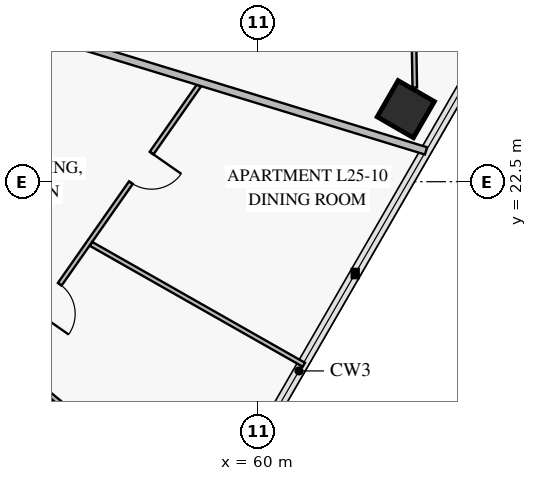
"""IFC4 building model, lengths in metres.
Left out: names, types, materials, properties, quantities, classifications, styles, units other than length and angle.
Written with IfcOpenShell. Run it as: python <this file> out.ifc"""

import sys

from ifc_helpers import new_model, si_unit, direction, frame, frame_2d, origin, origin_2d, place, context, subcontext, project, spatial, rectangle, extrude, element, fill, save


model = new_model("IFC4")
c1 = context("Model", 3, precision=1e-05, world=origin(), true_north=direction((0.0, 1.0)))
c2 = subcontext(c1, "Body", "Model", "MODEL_VIEW")
j1 = project(units=[si_unit("LENGTHUNIT", "METRE"), si_unit("PLANEANGLEUNIT", "RADIAN")], contexts=[c1])
p1 = place(None, origin())
s1 = spatial("IfcSite", under=j1, at=p1, CompositionType="ELEMENT")
p2 = place(p1, origin())
s2 = spatial("IfcBuilding", under=s1, at=p2, CompositionType="ELEMENT")
p3 = place(p2, frame((0.0, 0.0, 103.8)))
s3 = spatial("IfcBuildingStorey", under=s2, at=p3, CompositionType="ELEMENT", Elevation=103.8)
p4 = place(p3, frame((63.889, 24.408, 0.0), z_axis=(0.0, 0.0, 1.0), x_axis=(0.5, 0.866025403784, 0.0)))
e1 = element("IfcColumn", 1, at=p4, inside=s3, PredefinedType="COLUMN", context=c2, shape_type="SweptSolid", body=[
    extrude(rectangle(XDim=1.1, YDim=1.1, at=origin_2d()), origin(), (0.0, 0.0, 1.0), 3.55),
])
p5 = place(p3, frame((53.335, 17.732, 0.0), z_axis=(0.0, 0.0, 1.0), x_axis=(0.573576398243, 0.819152070972, 0.0)))
e2 = element("IfcWall", 2, at=p5, inside=s3, PredefinedType="PARTITIONING", context=c2, shape_type="SweptSolid", body=[
    extrude(rectangle(XDim=8.907, YDim=0.12, at=frame_2d((4.453, 0.0))), origin(), (0.0, 0.0, 1.0), 3.55),
])
p6 = place(p5, frame((1.576, 0.0, 0.0)))
e3 = element("IfcOpeningElement", 3, at=p6, cuts=e2, PredefinedType="OPENING", context=c2, shape_type="SweptSolid", body=[
    extrude(rectangle(XDim=0.95, YDim=2.1, at=frame_2d((0.475, 1.05))), frame((0.0, 0.072, 0.0), z_axis=(0.0, -1.0, 0.0), x_axis=(1.0, 0.0, 0.0)), (0.0, 0.0, 1.0), 0.144),
])
p7 = place(p5, frame((5.789, 0.0, 0.0)))
e4 = element("IfcOpeningElement", 4, at=p7, cuts=e2, PredefinedType="OPENING", context=c2, shape_type="SweptSolid", body=[
    extrude(rectangle(XDim=0.95, YDim=2.1, at=frame_2d((0.475, 1.05))), frame((0.0, 0.072, 0.0), z_axis=(0.0, -1.0, 0.0), x_axis=(1.0, 0.0, 0.0)), (0.0, 0.0, 1.0), 0.144),
])
p8 = place(p3, frame((53.446, 17.771, 0.0), z_axis=(0.0, 0.0, 1.0), x_axis=(0.774958236323, -0.632012446045, 0.0)))
e5 = element("IfcWall", 5, at=p8, inside=s3, PredefinedType="PARTITIONING", context=c2, shape_type="SweptSolid", body=[
    extrude(rectangle(XDim=4.017, YDim=0.12, at=frame_2d((2.009, 0.0))), origin(), (0.0, 0.0, 1.0), 3.55),
])
p9 = place(p3, frame((64.126, 24.979, 0.0), z_axis=(0.0, 0.0, 1.0), x_axis=(-0.017448954527, 0.999847755404, 0.0)))
e6 = element("IfcWall", 6, at=p9, inside=s3, PredefinedType="PARTITIONING", context=c2, shape_type="SweptSolid", body=[
    extrude(rectangle(XDim=5.387, YDim=0.12, at=frame_2d((2.693, 0.0))), origin(), (0.0, 0.0, 1.0), 2.8),
])
p10 = place(p9, frame((2.303, 0.0, 0.0)))
e7 = element("IfcOpeningElement", 7, at=p10, cuts=e6, PredefinedType="OPENING", context=c2, shape_type="SweptSolid", body=[
    extrude(rectangle(XDim=0.95, YDim=2.1, at=frame_2d((0.475, 1.05))), frame((0.0, 0.072, 0.0), z_axis=(0.0, -1.0, 0.0), x_axis=(1.0, 0.0, 0.0)), (0.0, 0.0, 1.0), 0.144),
])
p11 = place(p3, frame((45.073, 19.96, 0.0), z_axis=(0.0, 0.0, 1.0), x_axis=(0.60181525353, -0.798635336445, 0.0)))
e8 = element("IfcWall", 8, at=p11, inside=s3, PredefinedType="PARTITIONING", context=c2, shape_type="SweptSolid", body=[
    extrude(rectangle(XDim=16.384, YDim=0.2, at=frame_2d((8.192, 0.0))), origin(), (0.0, 0.0, 1.0), 2.8),
])
p12 = place(p3, frame((55.61, 20.862, 0.0), z_axis=(0.0, 0.0, 1.0), x_axis=(0.869533184144, -0.493874520169, 0.0)))
e9 = element("IfcWall", 9, at=p12, inside=s3, PredefinedType="PARTITIONING", context=c2, shape_type="SweptSolid", body=[
    extrude(rectangle(XDim=6.437, YDim=0.12, at=frame_2d((3.219, 0.0))), origin(), (0.0, 0.0, 1.0), 2.8),
])
p13 = place(p3, frame((49.04, 28.013, 0.0), z_axis=(0.0, 0.0, 1.0), x_axis=(0.956308788135, -0.292358515757, 0.0)))
e10 = element("IfcWall", 10, at=p13, inside=s3, PredefinedType="PARTITIONING", context=c2, shape_type="SweptSolid", body=[
    extrude(rectangle(XDim=16.084, YDim=0.2, at=frame_2d((8.042, 0.0))), origin(), (0.0, 0.0, 1.0), 2.8),
])
p14 = place(p6, frame((0.95, 0.0, 0.0), z_axis=(0.0, 0.0, 1.0), x_axis=(-1.0, 0.0, 0.0)))
e11 = element("IfcDoor", 11, at=p14, inside=s3, OperationType="SINGLE_SWING_RIGHT", PredefinedType="DOOR", context=c2, shape_type="SweptSolid", body=[
    extrude(rectangle(XDim=0.95, YDim=2.1, at=frame_2d((0.475, 1.05))), frame((0.0, 0.025, 0.0), z_axis=(0.0, -1.0, 0.0), x_axis=(1.0, 0.0, 0.0)), (0.0, 0.0, 1.0), 0.05),
])
fill(e3, e11)
p15 = place(p7, frame((0.95, 0.0, 0.0), z_axis=(0.0, 0.0, 1.0), x_axis=(-1.0, 0.0, 0.0)))
e12 = element("IfcDoor", 12, at=p15, inside=s3, OperationType="SINGLE_SWING_LEFT", PredefinedType="DOOR", context=c2, shape_type="SweptSolid", body=[
    extrude(rectangle(XDim=0.95, YDim=2.1, at=frame_2d((0.475, 1.05))), frame((0.0, 0.025, 0.0), z_axis=(0.0, -1.0, 0.0), x_axis=(1.0, 0.0, 0.0)), (0.0, 0.0, 1.0), 0.05),
])
fill(e4, e12)
save(model, sys.argv[1])
